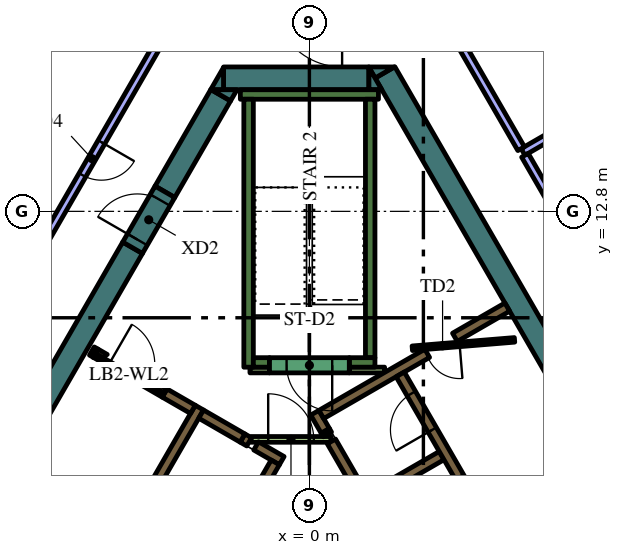
"""IFC4 building model, lengths in metres.
Left out: names, types, materials, properties, quantities, classifications, styles, units other than length and angle.
Written with IfcOpenShell. Run it as: python <this file> out.ifc"""

import sys

from ifc_helpers import new_model, si_unit, direction, frame, frame_2d, origin, place, context, subcontext, project, spatial, polyline, rectangle, outline, extrude, element, fill, save


model = new_model("IFC4")
c1 = context("Model", 3, precision=1e-05, world=origin(), true_north=direction((0.0, 1.0)))
c2 = subcontext(c1, "Body", "Model", "MODEL_VIEW")
j1 = project(units=[si_unit("LENGTHUNIT", "METRE"), si_unit("PLANEANGLEUNIT", "RADIAN")], contexts=[c1])
p1 = place(None, origin())
s1 = spatial("IfcSite", under=j1, at=p1, CompositionType="ELEMENT")
p2 = place(p1, origin())
s2 = spatial("IfcBuilding", under=s1, at=p2, CompositionType="ELEMENT")
p3 = place(p2, frame((0.0, 0.0, 317.4)))
s3 = spatial("IfcBuildingStorey", under=s2, at=p3, CompositionType="ELEMENT", Elevation=317.4)
p4 = place(p3, frame((1.989, 16.456, 0.0), z_axis=(0.0, 0.0, 1.0), x_axis=(0.49999102663, -0.8660305845, 0.0)))
e1 = element("IfcWall", 1, at=p4, inside=s3, PredefinedType="SOLIDWALL", context=c2, shape_type="SweptSolid", body=[
    extrude(rectangle(XDim=12.406, YDim=0.6, at=frame_2d((6.203, 0.0))), origin(), (0.0, 0.0, 1.0), 4.2),
])
p5 = place(p3, origin())
e2 = element("IfcWall", 2, at=p5, inside=s3, PredefinedType="SOLIDWALL", context=c2, shape_type="SweptSolid", body=[
    extrude(outline(polyline([(1.559, 16.6), (2.235, 16.6), (1.728, 16.307), (1.559, 16.6)])), origin(), (0.0, 0.0, 1.0), 4.2),
])
p6 = place(p3, frame((-2.258, 16.3, 0.0), z_axis=(0.0, 0.0, 1.0), x_axis=(1.0, 0.0, 0.0)))
e3 = element("IfcWall", 3, at=p6, inside=s3, PredefinedType="SOLIDWALL", context=c2, shape_type="SweptSolid", body=[
    extrude(rectangle(XDim=3.823, YDim=0.6, at=frame_2d((1.912, 0.0))), origin(), (0.0, 0.0, 1.0), 4.2),
])
e4 = element("IfcWall", 4, at=p5, inside=s3, PredefinedType="SOLIDWALL", context=c2, shape_type="SweptSolid", body=[
    extrude(outline(polyline([(1.905, 16.0), (1.567, 16.0), (1.567, 16.585), (1.905, 16.0)])), origin(), (0.0, 0.0, 1.0), 4.2),
])
e5 = element("IfcWall", 5, at=p5, inside=s3, PredefinedType="SOLIDWALL", context=c2, shape_type="SweptSolid", body=[
    extrude(outline(polyline([(-2.598, 16.0), (-2.26, 16.585), (-2.26, 16.0), (-2.598, 16.0)])), origin(), (0.0, 0.0, 1.0), 4.2),
])
p7 = place(p3, frame((-2.335, 15.855, 0.0), z_axis=(0.0, 0.0, 1.0), x_axis=(-0.499960127962, -0.866048422692, 0.0)))
e6 = element("IfcWall", 6, at=p7, inside=s3, PredefinedType="SOLIDWALL", context=c2, shape_type="SweptSolid", body=[
    extrude(rectangle(XDim=2.934, YDim=0.6, at=frame_2d((1.467, 0.0))), origin(), (0.0, 0.0, 1.0), 4.2),
])
e7 = element("IfcWall", 7, at=p5, inside=s3, PredefinedType="SOLIDWALL", context=c2, shape_type="SweptSolid", body=[
    extrude(outline(polyline([(-1.905, 16.0), (-2.074, 15.707), (-2.581, 16.0), (-1.905, 16.0)])), origin(), (0.0, 0.0, 1.0), 4.2),
])
p8 = place(p3, frame((-12.582, -1.892, 0.0), z_axis=(0.0, 0.0, 1.0), x_axis=(0.500003640647, 0.866023301845, 0.0)))
e8 = element("IfcWall", 8, at=p8, inside=s3, PredefinedType="SOLIDWALL", context=c2, shape_type="SweptSolid", body=[
    extrude(rectangle(XDim=15.858, YDim=0.6, at=frame_2d((7.929, 0.0))), origin(), (0.0, 0.0, 1.0), 4.2),
])
p9 = place(p3, frame((-1.817, 15.875, 0.0), z_axis=(0.0, 0.0, 1.0), x_axis=(1.0, 0.0, 0.0)))
e9 = element("IfcWall", 9, at=p9, inside=s3, PredefinedType="SOLIDWALL", context=c2, shape_type="SweptSolid", body=[
    extrude(rectangle(XDim=3.634, YDim=0.25, at=frame_2d((1.817, 0.0))), origin(), (0.0, 0.0, 1.0), 4.2),
])
p10 = place(p3, frame((1.6, 8.95, 0.0), z_axis=(0.0, 0.0, 1.0), x_axis=(0.0, 1.0, 0.0)))
e10 = element("IfcWall", 10, at=p10, inside=s3, PredefinedType="SOLIDWALL", context=c2, shape_type="SweptSolid", body=[
    extrude(rectangle(XDim=6.8, YDim=0.25, at=frame_2d((3.4, 0.0))), origin(), (0.0, 0.0, 1.0), 4.2),
])
p11 = place(p3, frame((1.05, 8.825, 0.0), z_axis=(0.0, 0.0, 1.0), x_axis=(1.0, 0.0, 0.0)))
e11 = element("IfcWall", 11, at=p11, inside=s3, PredefinedType="SOLIDWALL", context=c2, shape_type="SweptSolid", body=[
    extrude(rectangle(XDim=0.675, YDim=0.25, at=frame_2d((0.337, 0.0))), origin(), (0.0, 0.0, 1.0), 4.2),
])
p12 = place(p3, frame((-1.6, 8.7, 0.0), z_axis=(0.0, 0.0, 1.0), x_axis=(0.0, 1.0, 0.0)))
e12 = element("IfcWall", 12, at=p12, inside=s3, PredefinedType="SOLIDWALL", context=c2, shape_type="SweptSolid", body=[
    extrude(rectangle(XDim=7.05, YDim=0.25, at=frame_2d((3.525, 0.0))), origin(), (0.0, 0.0, 1.0), 4.2),
])
p13 = place(p3, frame((-1.475, 8.825, 0.0), z_axis=(0.0, 0.0, 1.0), x_axis=(1.0, 0.0, 0.0)))
e13 = element("IfcWall", 13, at=p13, inside=s3, PredefinedType="SOLIDWALL", context=c2, shape_type="SweptSolid", body=[
    extrude(rectangle(XDim=0.425, YDim=0.25, at=frame_2d((0.212, 0.0))), origin(), (0.0, 0.0, 1.0), 4.2),
])
p14 = place(p3, frame((0.473, 6.93, 0.0), z_axis=(0.0, 0.0, 1.0), x_axis=(-0.49972245349, 0.866185586049, 0.0)))
e14 = element("IfcWall", 14, at=p14, inside=s3, PredefinedType="SOLIDWALL", context=c2, shape_type="SweptSolid", body=[
    extrude(rectangle(XDim=0.11, YDim=0.25, at=frame_2d((0.055, 0.0))), origin(), (0.0, 0.0, 1.0), 4.2),
])
p15 = place(p3, frame((6.568, -3.627, 0.0), z_axis=(0.0, 0.0, 1.0), x_axis=(-0.499999455981, 0.866025717874, 0.0)))
e15 = element("IfcWall", 15, at=p15, inside=s3, PredefinedType="SOLIDWALL", context=c2, shape_type="SweptSolid", body=[
    extrude(rectangle(XDim=11.978, YDim=0.25, at=frame_2d((5.989, 0.0))), origin(), (0.0, 0.0, 1.0), 4.2),
])
p16 = place(p3, frame((0.417, 7.027, 0.0), z_axis=(0.0, 0.0, 1.0), x_axis=(-0.500210807569, 0.865903659763, 0.0)))
e16 = element("IfcWall", 16, at=p16, inside=s3, PredefinedType="SOLIDWALL", context=c2, shape_type="SweptSolid", body=[
    extrude(rectangle(XDim=0.548, YDim=0.25, at=frame_2d((0.274, 0.0))), origin(), (0.0, 0.0, 1.0), 4.2),
])
p17 = place(p3, frame((3.1, 9.064, 0.0), z_axis=(0.0, 0.0, 1.0), x_axis=(-0.866030133475, -0.499991807846, 0.0)))
e17 = element("IfcWall", 17, at=p17, inside=s3, PredefinedType="SOLIDWALL", context=c2, shape_type="SweptSolid", body=[
    extrude(rectangle(XDim=3.217, YDim=0.25, at=frame_2d((1.608, 0.0))), origin(), (0.0, 0.0, 1.0), 4.2),
])
p18 = place(p3, frame((1.574, 5.274, 0.0), z_axis=(0.0, 0.0, 1.0), x_axis=(0.866028486751, 0.499994660107, 0.0)))
e18 = element("IfcWall", 18, at=p18, inside=s3, PredefinedType="SOLIDWALL", context=c2, shape_type="SweptSolid", body=[
    extrude(rectangle(XDim=2.2, YDim=0.25, at=frame_2d((1.1, 0.0))), origin(), (0.0, 0.0, 1.0), 4.2),
])
p19 = place(p3, frame((3.83, 9.486, 0.0), z_axis=(0.0, 0.0, 1.0), x_axis=(0.865986202621, 0.500067892261, 0.0)))
e19 = element("IfcWall", 19, at=p19, inside=s3, PredefinedType="SOLIDWALL", context=c2, shape_type="SweptSolid", body=[
    extrude(rectangle(XDim=1.591, YDim=0.25, at=frame_2d((0.795, 0.0))), origin(), (0.0, 0.0, 1.0), 4.2),
])
p20 = place(p3, frame((-8.06, -1.311, 0.0), z_axis=(0.0, 0.0, 1.0), x_axis=(0.50000273126, 0.866023826885, 0.0)))
e20 = element("IfcWall", 20, at=p20, inside=s3, PredefinedType="SOLIDWALL", context=c2, shape_type="SweptSolid", body=[
    extrude(rectangle(XDim=10.33, YDim=0.25, at=frame_2d((5.165, 0.0))), origin(), (0.0, 0.0, 1.0), 4.2),
])
p21 = place(p3, frame((-1.758, 6.835, 0.0), z_axis=(0.0, 0.0, 1.0), x_axis=(0.865982457891, -0.500074377092, 0.0)))
e21 = element("IfcWall", 21, at=p21, inside=s3, PredefinedType="SOLIDWALL", context=c2, shape_type="SweptSolid", body=[
    extrude(rectangle(XDim=0.2, YDim=0.25, at=frame_2d((0.1, 0.0))), origin(), (0.0, 0.0, 1.0), 4.2),
])
p22 = place(p3, frame((-1.76, 6.836, 0.0), z_axis=(0.0, 0.0, 1.0), x_axis=(-0.865952863304, 0.500125622755, 0.0)))
e22 = element("IfcWall", 22, at=p22, inside=s3, PredefinedType="SOLIDWALL", context=c2, shape_type="SweptSolid", body=[
    extrude(rectangle(XDim=1.258, YDim=0.25, at=frame_2d((0.629, 0.0))), origin(), (0.0, 0.0, 1.0), 4.2),
])
p23 = place(p3, frame((-0.728, 6.24, 0.0), z_axis=(0.0, 0.0, 1.0), x_axis=(-0.865955664968, 0.500120771724, 0.0)))
e23 = element("IfcWall", 23, at=p23, inside=s3, PredefinedType="SOLIDWALL", context=c2, shape_type="SweptSolid", body=[
    extrude(rectangle(XDim=0.778, YDim=0.25, at=frame_2d((0.389, 0.0))), origin(), (0.0, 0.0, 1.0), 4.2),
])
p24 = place(p3, frame((-5.725, 9.125, 0.0), z_axis=(0.0, 0.0, 1.0), x_axis=(0.866185586049, -0.49972245349, 0.0)))
e24 = element("IfcWall", 24, at=p24, inside=s3, PredefinedType="SOLIDWALL", context=c2, shape_type="SweptSolid", body=[
    extrude(rectangle(XDim=0.11, YDim=0.25, at=frame_2d((0.055, 0.0))), origin(), (0.0, 0.0, 1.0), 4.2),
])
p25 = place(p3, frame((-3.066, 7.59, 0.0), z_axis=(0.0, 0.0, 1.0), x_axis=(-0.866081358704, 0.49990307071, 0.0)))
e25 = element("IfcWall", 25, at=p25, inside=s3, PredefinedType="SOLIDWALL", context=c2, shape_type="SweptSolid", body=[
    extrude(rectangle(XDim=0.858, YDim=0.25, at=frame_2d((0.429, 0.0))), origin(), (0.0, 0.0, 1.0), 4.2),
])
e26 = element("IfcWall", 26, at=p5, inside=s3, PredefinedType="SOLIDWALL", context=c2, shape_type="SweptSolid", body=[
    extrude(outline(polyline([(-3.748, 8.128), (-3.813, 8.015), (-4.027, 8.139), (-4.017, 8.156), (-4.008, 8.173), (-4.0, 8.192), (-3.995, 8.21), (-3.991, 8.23), (-3.99, 8.25), (-3.99, 8.268), (-3.748, 8.128)])), origin(), (0.0, 0.0, 1.0), 4.2),
])
e27 = element("IfcWall", 27, at=p5, inside=s3, PredefinedType="SOLIDWALL", context=c2, shape_type="SweptSolid", body=[
    extrude(outline(polyline([(-5.689, 8.96), (-5.69, 8.961), (-5.565, 9.177), (-5.319, 9.035), (-5.335, 9.026), (-5.351, 9.015), (-5.366, 9.002), (-5.379, 8.988), (-5.392, 8.972), (-5.402, 8.956), (-5.412, 8.939), (-5.629, 9.064), (-5.629, 9.064), (-5.689, 8.96)])), origin(), (0.0, 0.0, 1.0), 4.2),
])
p26 = place(p3, frame((1.05, 8.625, 0.0), z_axis=(0.0, 0.0, 1.0), x_axis=(1.0, 0.0, 0.0)))
e28 = element("IfcWall", 28, at=p26, inside=s3, PredefinedType="PARTITIONING", context=c2, shape_type="SweptSolid", body=[
    extrude(rectangle(XDim=0.929, YDim=0.15, at=frame_2d((0.464, 0.0))), origin(), (0.0, 0.0, 1.0), 3.5),
])
p27 = place(p3, frame((-1.564, 8.625, 0.0), z_axis=(0.0, 0.0, 1.0), x_axis=(1.0, 0.0, 0.0)))
e29 = element("IfcWall", 29, at=p27, inside=s3, PredefinedType="PARTITIONING", context=c2, shape_type="SweptSolid", body=[
    extrude(rectangle(XDim=0.514, YDim=0.15, at=frame_2d((0.257, 0.0))), origin(), (0.0, 0.0, 1.0), 3.5),
])
p28 = place(p3, frame((8.565, -2.185, 0.0), z_axis=(0.0, 0.0, 1.0), x_axis=(-0.499997954832, 0.866026584559, 0.0)))
e30 = element("IfcWall", 30, at=p28, inside=s3, PredefinedType="SOLIDWALL", context=c2, shape_type="SweptSolid", body=[
    extrude(rectangle(XDim=12.35, YDim=0.25, at=frame_2d((6.175, 0.0))), origin(), (0.0, 0.0, 1.0), 4.2),
])
p29 = place(p28, frame((0.685, 0.0, 0.0)))
e31 = element("IfcOpeningElement", 31, at=p29, cuts=e30, PredefinedType="OPENING", context=c2, shape_type="SweptSolid", body=[
    extrude(rectangle(XDim=0.9, YDim=2.1, at=frame_2d((0.45, 1.05))), frame((0.0, 0.135, 0.0), z_axis=(0.0, -1.0, 0.0), x_axis=(1.0, 0.0, 0.0)), (0.0, 0.0, 1.0), 0.27),
])
p30 = place(p28, frame((3.105, 0.0, 0.0)))
e32 = element("IfcOpeningElement", 32, at=p30, cuts=e30, PredefinedType="OPENING", context=c2, shape_type="SweptSolid", body=[
    extrude(rectangle(XDim=1.1, YDim=2.1, at=frame_2d((0.55, 1.05))), frame((0.0, 0.135, 0.0), z_axis=(0.0, -1.0, 0.0), x_axis=(1.0, 0.0, 0.0)), (0.0, 0.0, 1.0), 0.27),
])
p31 = place(p28, frame((5.625, 0.0, 0.0)))
e33 = element("IfcOpeningElement", 33, at=p31, cuts=e30, PredefinedType="OPENING", context=c2, shape_type="SweptSolid", body=[
    extrude(rectangle(XDim=1.1, YDim=2.1, at=frame_2d((0.55, 1.05))), frame((0.0, 0.135, 0.0), z_axis=(0.0, -1.0, 0.0), x_axis=(1.0, 0.0, 0.0)), (0.0, 0.0, 1.0), 0.27),
])
p32 = place(p28, frame((8.145, 0.0, 0.0)))
e34 = element("IfcOpeningElement", 34, at=p32, cuts=e30, PredefinedType="OPENING", context=c2, shape_type="SweptSolid", body=[
    extrude(rectangle(XDim=1.1, YDim=2.1, at=frame_2d((0.55, 1.05))), frame((0.0, 0.135, 0.0), z_axis=(0.0, -1.0, 0.0), x_axis=(1.0, 0.0, 0.0)), (0.0, 0.0, 1.0), 0.27),
])
p33 = place(p28, frame((10.665, 0.0, 0.0)))
e35 = element("IfcOpeningElement", 35, at=p33, cuts=e30, PredefinedType="OPENING", context=c2, shape_type="SweptSolid", body=[
    extrude(rectangle(XDim=1.1, YDim=2.1, at=frame_2d((0.55, 1.05))), frame((0.0, 0.135, 0.0), z_axis=(0.0, -1.0, 0.0), x_axis=(1.0, 0.0, 0.0)), (0.0, 0.0, 1.0), 0.27),
])
p34 = place(p3, frame((-0.898, 6.194, 0.0), z_axis=(0.0, 0.0, 1.0), x_axis=(-0.499996202215, -0.866027596426, 0.0)))
e36 = element("IfcWall", 36, at=p34, inside=s3, PredefinedType="SOLIDWALL", context=c2, shape_type="SweptSolid", body=[
    extrude(rectangle(XDim=9.83, YDim=0.25, at=frame_2d((4.915, 0.0))), origin(), (0.0, 0.0, 1.0), 4.2),
])
p35 = place(p34, frame((0.585, 0.0, 0.0)))
e37 = element("IfcOpeningElement", 37, at=p35, cuts=e36, PredefinedType="OPENING", context=c2, shape_type="SweptSolid", body=[
    extrude(rectangle(XDim=1.1, YDim=2.1, at=frame_2d((0.55, 1.05))), frame((0.0, 0.135, 0.0), z_axis=(0.0, -1.0, 0.0), x_axis=(1.0, 0.0, 0.0)), (0.0, 0.0, 1.0), 0.27),
])
p36 = place(p34, frame((3.105, 0.0, 0.0)))
e38 = element("IfcOpeningElement", 38, at=p36, cuts=e36, PredefinedType="OPENING", context=c2, shape_type="SweptSolid", body=[
    extrude(rectangle(XDim=1.1, YDim=2.1, at=frame_2d((0.55, 1.05))), frame((0.0, 0.135, 0.0), z_axis=(0.0, -1.0, 0.0), x_axis=(1.0, 0.0, 0.0)), (0.0, 0.0, 1.0), 0.27),
])
p37 = place(p34, frame((5.625, 0.0, 0.0)))
e39 = element("IfcOpeningElement", 39, at=p37, cuts=e36, PredefinedType="OPENING", context=c2, shape_type="SweptSolid", body=[
    extrude(rectangle(XDim=1.1, YDim=2.1, at=frame_2d((0.55, 1.05))), frame((0.0, 0.135, 0.0), z_axis=(0.0, -1.0, 0.0), x_axis=(1.0, 0.0, 0.0)), (0.0, 0.0, 1.0), 0.27),
])
p38 = place(p34, frame((8.145, 0.0, 0.0)))
e40 = element("IfcOpeningElement", 40, at=p38, cuts=e36, PredefinedType="OPENING", context=c2, shape_type="SweptSolid", body=[
    extrude(rectangle(XDim=1.1, YDim=2.1, at=frame_2d((0.55, 1.05))), frame((0.0, 0.135, 0.0), z_axis=(0.0, -1.0, 0.0), x_axis=(1.0, 0.0, 0.0)), (0.0, 0.0, 1.0), 0.27),
])
p39 = place(p3, frame((1.05, 8.75, 0.0), z_axis=(0.0, 0.0, 1.0), x_axis=(-1.0, 0.0, 0.0)))
e41 = element("IfcWall", 41, at=p39, inside=s3, PredefinedType="SOLIDWALL", context=c2, shape_type="SweptSolid", body=[
    extrude(rectangle(XDim=2.1, YDim=0.4, at=frame_2d((1.05, 0.0))), origin(), (0.0, 0.0, 1.0), 4.2),
])
p40 = place(p39, frame((0.45, 0.0, 0.0)))
e42 = element("IfcOpeningElement", 42, at=p40, cuts=e41, PredefinedType="OPENING", context=c2, shape_type="SweptSolid", body=[
    extrude(rectangle(XDim=1.2, YDim=2.1, at=frame_2d((0.6, 1.05))), frame((0.0, 0.21, 0.0), z_axis=(0.0, -1.0, 0.0), x_axis=(1.0, 0.0, 0.0)), (0.0, 0.0, 1.0), 0.42),
])
p41 = place(p3, frame((5.398, 9.419, 0.0), z_axis=(0.0, 0.0, 1.0), x_axis=(-0.996653416376, -0.081743303248, 0.0)))
e43 = element("IfcWall", 43, at=p41, inside=s3, PredefinedType="PARTITIONING", context=c2, shape_type="SweptSolid", body=[
    extrude(rectangle(XDim=2.7, YDim=0.12, at=frame_2d((1.35, 0.0))), origin(), (0.0, 0.0, 1.0), 3.5),
])
p42 = place(p41, frame((1.45, 0.0, 0.0)))
e44 = element("IfcOpeningElement", 44, at=p42, cuts=e43, PredefinedType="OPENING", context=c2, shape_type="SweptSolid", body=[
    extrude(rectangle(XDim=0.9, YDim=2.1, at=frame_2d((0.45, 1.05))), frame((0.0, 0.07, 0.0), z_axis=(0.0, -1.0, 0.0), x_axis=(1.0, 0.0, 0.0)), (0.0, 0.0, 1.0), 0.14),
])
p43 = place(p3, frame((-1.534, 6.8, 0.0), z_axis=(0.0, 0.0, 1.0), x_axis=(1.0, 0.0, 0.0)))
e45 = element("IfcWall", 45, at=p43, inside=s3, PredefinedType="PARTITIONING", context=c2, shape_type="SweptSolid", body=[
    extrude(rectangle(XDim=2.1, YDim=0.15, at=frame_2d((1.05, 0.0))), origin(), (0.0, 0.0, 1.0), 3.5),
])
p44 = place(p43, frame((0.45, 0.0, 0.0)))
e46 = element("IfcOpeningElement", 46, at=p44, cuts=e45, PredefinedType="OPENING", context=c2, shape_type="SweptSolid", body=[
    extrude(rectangle(XDim=1.2, YDim=2.1, at=frame_2d((0.6, 1.05))), frame((0.0, 0.085, 0.0), z_axis=(0.0, -1.0, 0.0), x_axis=(1.0, 0.0, 0.0)), (0.0, 0.0, 1.0), 0.17),
])
p45 = place(p3, frame((-5.659, 9.012, 0.0), z_axis=(0.0, 0.0, 1.0), x_axis=(0.866009402589, -0.500027713859, 0.0)))
e47 = element("IfcWall", 47, at=p45, inside=s3, PredefinedType="PARTITIONING", context=c2, shape_type="SweptSolid", body=[
    extrude(rectangle(XDim=2.1, YDim=0.12, at=frame_2d((1.05, 0.0))), origin(), (0.0, 0.0, 1.0), 3.5),
])
p46 = place(p45, frame((0.45, 0.0, 0.0)))
e48 = element("IfcOpeningElement", 48, at=p46, cuts=e47, PredefinedType="OPENING", context=c2, shape_type="SweptSolid", body=[
    extrude(rectangle(XDim=1.2, YDim=2.1, at=frame_2d((0.6, 1.05))), frame((0.0, 0.07, 0.0), z_axis=(0.0, -1.0, 0.0), x_axis=(1.0, 0.0, 0.0)), (0.0, 0.0, 1.0), 0.14),
])
p47 = place(p3, frame((-4.652, 11.842, 0.0), z_axis=(0.0, 0.0, 1.0), x_axis=(0.500062241894, 0.865989465428, 0.0)))
e49 = element("IfcWall", 49, at=p47, inside=s3, PredefinedType="SOLIDWALL", context=c2, shape_type="SweptSolid", body=[
    extrude(rectangle(XDim=1.7, YDim=0.6, at=frame_2d((0.85, 0.0))), origin(), (0.0, 0.0, 1.0), 4.2),
])
p48 = place(p47, frame((0.25, 0.0, 0.0)))
e50 = element("IfcOpeningElement", 50, at=p48, cuts=e49, PredefinedType="OPENING", context=c2, shape_type="SweptSolid", body=[
    extrude(rectangle(XDim=1.2, YDim=2.1, at=frame_2d((0.6, 1.05))), frame((0.0, 0.31, 0.0), z_axis=(0.0, -1.0, 0.0), x_axis=(1.0, 0.0, 0.0)), (0.0, 0.0, 1.0), 0.62),
])
p49 = place(p3, frame((5.622, 14.363, 0.0), z_axis=(0.0, 0.0, 1.0), x_axis=(0.866030409726, 0.499991329354, 0.0)))
e51 = element("IfcWall", 51, at=p49, inside=s3, PredefinedType="PARTITIONING", context=c2, shape_type="SweptSolid", body=[
    extrude(rectangle(XDim=5.869, YDim=0.2, at=frame_2d((2.934, 0.0))), origin(), (0.0, 0.0, 1.0), 3.5),
])
p50 = place(p3, frame((7.921, 10.381, 0.0), z_axis=(0.0, 0.0, 1.0), x_axis=(-0.500021625289, 0.866012918058, 0.0)))
e52 = element("IfcWall", 52, at=p50, inside=s3, PredefinedType="PARTITIONING", context=c2, shape_type="SweptSolid", body=[
    extrude(rectangle(XDim=4.497, YDim=0.2, at=frame_2d((2.249, 0.0))), origin(), (0.0, 0.0, 1.0), 3.5),
])
p51 = place(p3, frame((5.572, 14.449, 0.0), z_axis=(0.0, 0.0, 1.0), x_axis=(-0.500012761589, 0.866018035752, 0.0)))
e53 = element("IfcWall", 53, at=p51, inside=s3, PredefinedType="PARTITIONING", context=c2, shape_type="SweptSolid", body=[
    extrude(rectangle(XDim=4.562, YDim=0.2, at=frame_2d((2.281, 0.0))), origin(), (0.0, 0.0, 1.0), 3.5),
])
p52 = place(p3, frame((-3.523, 17.998, 0.0), z_axis=(0.0, 0.0, 1.0), x_axis=(-0.499996383721, -0.866027491634, 0.0)))
e54 = element("IfcWall", 54, at=p52, inside=s3, PredefinedType="PARTITIONING", context=c2, shape_type="SweptSolid", body=[
    extrude(rectangle(XDim=8.795, YDim=0.2, at=frame_2d((4.397, 0.0))), origin(), (0.0, 0.0, 1.0), 3.5),
])
p53 = place(p52, frame((3.9, 0.0, 0.0)))
e55 = element("IfcOpeningElement", 55, at=p53, cuts=e54, PredefinedType="OPENING", context=c2, shape_type="SweptSolid", body=[
    extrude(rectangle(XDim=1.0, YDim=2.1, at=frame_2d((0.5, 1.05))), frame((0.0, 0.11, 0.0), z_axis=(0.0, -1.0, 0.0), x_axis=(1.0, 0.0, 0.0)), (0.0, 0.0, 1.0), 0.22),
])
p54 = place(p33, origin())
e56 = element("IfcDoor", 56, at=p54, inside=s3, OperationType="DOUBLE_DOOR_SLIDING", PredefinedType="DOOR", context=c2, shape_type="SweptSolid", body=[
    extrude(rectangle(XDim=1.1, YDim=2.1, at=frame_2d((0.55, 1.05))), frame((0.0, 0.025, 0.0), z_axis=(0.0, -1.0, 0.0), x_axis=(1.0, 0.0, 0.0)), (0.0, 0.0, 1.0), 0.05),
])
fill(e35, e56)
p55 = place(p40, origin())
e57 = element("IfcDoor", 57, at=p55, inside=s3, OperationType="SINGLE_SWING_LEFT", PredefinedType="DOOR", context=c2, shape_type="SweptSolid", body=[
    extrude(rectangle(XDim=1.2, YDim=2.1, at=frame_2d((0.6, 1.05))), frame((0.0, 0.025, 0.0), z_axis=(0.0, -1.0, 0.0), x_axis=(1.0, 0.0, 0.0)), (0.0, 0.0, 1.0), 0.05),
])
fill(e42, e57)
p56 = place(p42, origin())
e58 = element("IfcDoor", 58, at=p56, inside=s3, OperationType="SINGLE_SWING_LEFT", PredefinedType="DOOR", context=c2, shape_type="SweptSolid", body=[
    extrude(rectangle(XDim=0.9, YDim=2.1, at=frame_2d((0.45, 1.05))), frame((0.0, 0.025, 0.0), z_axis=(0.0, -1.0, 0.0), x_axis=(1.0, 0.0, 0.0)), (0.0, 0.0, 1.0), 0.05),
])
fill(e44, e58)
p57 = place(p44, origin())
e59 = element("IfcDoor", 59, at=p57, inside=s3, OperationType="SINGLE_SWING_LEFT", PredefinedType="DOOR", context=c2, shape_type="SweptSolid", body=[
    extrude(rectangle(XDim=1.2, YDim=2.1, at=frame_2d((0.6, 1.05))), frame((0.0, 0.025, 0.0), z_axis=(0.0, -1.0, 0.0), x_axis=(1.0, 0.0, 0.0)), (0.0, 0.0, 1.0), 0.05),
])
fill(e46, e59)
p58 = place(p46, origin())
e60 = element("IfcDoor", 60, at=p58, inside=s3, OperationType="SINGLE_SWING_LEFT", PredefinedType="DOOR", context=c2, shape_type="SweptSolid", body=[
    extrude(rectangle(XDim=1.2, YDim=2.1, at=frame_2d((0.6, 1.05))), frame((0.0, 0.025, 0.0), z_axis=(0.0, -1.0, 0.0), x_axis=(1.0, 0.0, 0.0)), (0.0, 0.0, 1.0), 0.05),
])
fill(e48, e60)
p59 = place(p48, origin())
e61 = element("IfcDoor", 61, at=p59, inside=s3, OperationType="SINGLE_SWING_LEFT", PredefinedType="DOOR", context=c2, shape_type="SweptSolid", body=[
    extrude(rectangle(XDim=1.2, YDim=2.1, at=frame_2d((0.6, 1.05))), frame((0.0, 0.025, 0.0), z_axis=(0.0, -1.0, 0.0), x_axis=(1.0, 0.0, 0.0)), (0.0, 0.0, 1.0), 0.05),
])
fill(e50, e61)
p60 = place(p53, origin())
e62 = element("IfcDoor", 62, at=p60, inside=s3, OperationType="SINGLE_SWING_RIGHT", PredefinedType="DOOR", context=c2, shape_type="SweptSolid", body=[
    extrude(rectangle(XDim=1.0, YDim=2.1, at=frame_2d((0.5, 1.05))), frame((0.0, 0.025, 0.0), z_axis=(0.0, -1.0, 0.0), x_axis=(1.0, 0.0, 0.0)), (0.0, 0.0, 1.0), 0.05),
])
fill(e55, e62)
save(model, sys.argv[1])
